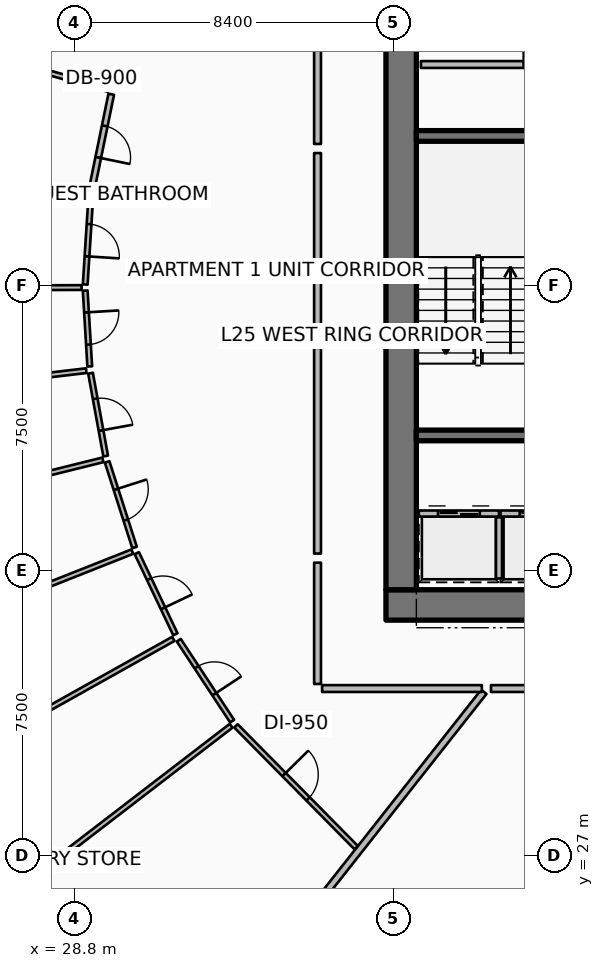
"""IFC4 building model, lengths in metres.
Left out: names, types, materials, properties, quantities, classifications, styles, units other than length and angle.
Written with IfcOpenShell. Run it as: python <this file> out.ifc"""

import sys

from ifc_helpers import new_model, si_unit, direction, frame, frame_2d, origin, place, context, subcontext, project, spatial, rectangle, extrude, element, fill, save


model = new_model("IFC4")
c1 = context("Model", 3, precision=1e-05, world=origin(), true_north=direction((0.0, 1.0)))
c2 = subcontext(c1, "Body", "Model", "MODEL_VIEW")
j1 = project(units=[si_unit("LENGTHUNIT", "METRE"), si_unit("PLANEANGLEUNIT", "RADIAN")], contexts=[c1])
p1 = place(None, origin())
s1 = spatial("IfcSite", under=j1, at=p1, CompositionType="ELEMENT")
p2 = place(p1, origin())
s2 = spatial("IfcBuilding", under=s1, at=p2, CompositionType="ELEMENT")
p3 = place(p2, frame((0.0, 0.0, 101.4)))
s3 = spatial("IfcBuildingStorey", under=s2, at=p3, CompositionType="ELEMENT", Elevation=101.4)
p4 = place(p3, frame((37.0, 33.6, 0.0), z_axis=(0.0, 0.0, 1.0), x_axis=(1.0, 0.0, 0.0)))
e1 = element("IfcWall", 1, at=p4, inside=s3, PredefinedType="SHEAR", context=c2, shape_type="SweptSolid", body=[
    extrude(rectangle(XDim=9.9, YDim=0.8, at=frame_2d((4.95, 0.0))), origin(), (0.0, 0.0, 1.0), 3.75),
])
p5 = place(p3, frame((37.4, 34.0, 0.0), z_axis=(0.0, 0.0, 1.0), x_axis=(0.0, 1.0, 0.0)))
e2 = element("IfcWall", 2, at=p5, inside=s3, PredefinedType="SHEAR", context=c2, shape_type="SweptSolid", body=[
    extrude(rectangle(XDim=16.0, YDim=0.8, at=frame_2d((8.0, 0.0))), origin(), (0.0, 0.0, 1.0), 3.75),
])
for number, where, z_axis, x_axis in (
    (3, (37.8, 38.06, 0.0), (0.0, 0.0, 1.0), (1.0, 0.0, 0.0)),
    (4, (37.8, 45.94, 0.0), (0.0, 0.0, 1.0), (1.0, 0.0, 0.0)),
):
    element("IfcWall", number, at=place(p3, frame(where, z_axis=z_axis, x_axis=x_axis)), inside=s3, PredefinedType="SHEAR", context=c2, shape_type="SweptSolid", body=[
        extrude(rectangle(XDim=3.5, YDim=0.28, at=frame_2d((1.75, 0.0))), origin(), (0.0, 0.0, 1.0), 3.75),
    ])
p6 = place(p3, frame((37.865, 36.005, 0.0), z_axis=(0.0, 0.0, 1.0), x_axis=(1.0, 0.0, 0.0)))
e5 = element("IfcWall", 5, at=p6, inside=s3, PredefinedType="PARTITIONING", context=c2, shape_type="SweptSolid", body=[
    extrude(rectangle(XDim=2.11, YDim=0.16, at=frame_2d((1.055, 0.0))), origin(), (0.0, 0.0, 1.0), 3.5),
])
p7 = place(p6, frame((0.505, 0.0, 0.0)))
e6 = element("IfcOpeningElement", 6, at=p7, cuts=e5, PredefinedType="OPENING", context=c2, shape_type="SweptSolid", body=[
    extrude(rectangle(XDim=1.1, YDim=2.1, at=frame_2d((0.55, 1.05))), frame((0.0, 0.09, 0.0), z_axis=(0.0, -1.0, 0.0), x_axis=(1.0, 0.0, 0.0)), (0.0, 0.0, 1.0), 0.18),
])
p8 = place(p3, frame((39.975, 34.295, 0.0), z_axis=(0.0, 0.0, 1.0), x_axis=(0.0, 1.0, 0.0)))
e7 = element("IfcWall", 7, at=p8, inside=s3, PredefinedType="PARTITIONING", context=c2, shape_type="SweptSolid", body=[
    extrude(rectangle(XDim=1.61, YDim=0.16, at=frame_2d((0.805, 0.0))), origin(), (0.0, 0.0, 1.0), 3.5),
])
p9 = place(p3, frame((40.015, 36.005, 0.0), z_axis=(0.0, 0.0, 1.0), x_axis=(1.0, 0.0, 0.0)))
e8 = element("IfcWall", 8, at=p9, inside=s3, PredefinedType="PARTITIONING", context=c2, shape_type="SweptSolid", body=[
    extrude(rectangle(XDim=2.11, YDim=0.16, at=frame_2d((1.055, 0.0))), origin(), (0.0, 0.0, 1.0), 3.5),
])
p10 = place(p9, frame((0.505, 0.0, 0.0)))
e9 = element("IfcOpeningElement", 9, at=p10, cuts=e8, PredefinedType="OPENING", context=c2, shape_type="SweptSolid", body=[
    extrude(rectangle(XDim=1.1, YDim=2.1, at=frame_2d((0.55, 1.05))), frame((0.0, 0.09, 0.0), z_axis=(0.0, -1.0, 0.0), x_axis=(1.0, 0.0, 0.0)), (0.0, 0.0, 1.0), 0.18),
])
p11 = place(p3, frame((37.92, 47.82, 0.0), z_axis=(0.0, 0.0, 1.0), x_axis=(1.0, 0.0, 0.0)))
e10 = element("IfcWall", 10, at=p11, inside=s3, PredefinedType="PARTITIONING", context=c2, shape_type="SweptSolid", body=[
    extrude(rectangle(XDim=6.26, YDim=0.18, at=frame_2d((3.13, 0.0))), origin(), (0.0, 0.0, 1.0), 3.5),
])
p12 = place(p11, frame((2.705, 0.0, 0.0)))
e11 = element("IfcOpeningElement", 11, at=p12, cuts=e10, PredefinedType="OPENING", context=c2, shape_type="SweptSolid", body=[
    extrude(rectangle(XDim=0.85, YDim=2.06, at=frame_2d((0.425, 1.03))), frame((0.0, 0.1, 0.0), z_axis=(0.0, -1.0, 0.0), x_axis=(1.0, 0.0, 0.0)), (0.0, 0.0, 1.0), 0.2),
])
p13 = place(p3, frame((39.575, 31.314, 0.0), z_axis=(0.0, 0.0, 1.0), x_axis=(-0.619083417853, -0.785325233098, 0.0)))
e12 = element("IfcWall", 12, at=p13, inside=s3, PredefinedType="PARTITIONING", context=c2, shape_type="SweptSolid", body=[
    extrude(rectangle(XDim=15.063, YDim=0.18, at=frame_2d((7.532, 0.0))), origin(), (0.0, 0.0, 1.0), 2.94),
])
p14 = place(p3, frame((35.2, 51.971, 0.0), z_axis=(0.0, 0.0, 1.0), x_axis=(0.0, -1.0, 0.0)))
e13 = element("IfcWall", 13, at=p14, inside=s3, PredefinedType="PARTITIONING", context=c2, shape_type="SweptSolid", body=[
    extrude(rectangle(XDim=6.241, YDim=0.18, at=frame_2d((3.12, 0.0))), origin(), (0.0, 0.0, 1.0), 2.94),
])
p15 = place(p14, frame((2.57, 0.0, 0.0)))
e14 = element("IfcOpeningElement", 14, at=p15, cuts=e13, PredefinedType="OPENING", context=c2, shape_type="SweptSolid", body=[
    extrude(rectangle(XDim=1.1, YDim=2.1, at=frame_2d((0.55, 1.05))), frame((0.0, 0.1, 0.0), z_axis=(0.0, -1.0, 0.0), x_axis=(1.0, 0.0, 0.0)), (0.0, 0.0, 1.0), 0.2),
])
p16 = place(p3, frame((35.2, 45.49, 0.0), z_axis=(0.0, 0.0, 1.0), x_axis=(0.0, -1.0, 0.0)))
e15 = element("IfcWall", 15, at=p16, inside=s3, PredefinedType="PARTITIONING", context=c2, shape_type="SweptSolid", body=[
    extrude(rectangle(XDim=4.885, YDim=0.18, at=frame_2d((2.442, 0.0))), origin(), (0.0, 0.0, 1.0), 2.94),
])
p17 = place(p3, frame((29.695, 47.163, 0.0), z_axis=(0.0, 0.0, 1.0), x_axis=(-0.962455839824, 0.271438310467, 0.0)))
e16 = element("IfcWall", 16, at=p17, inside=s3, PredefinedType="PARTITIONING", context=c2, shape_type="SweptSolid", body=[
    extrude(rectangle(XDim=9.552, YDim=0.125, at=frame_2d((4.776, 0.0))), origin(), (0.0, 0.0, 1.0), 2.94),
])
p18 = place(p3, frame((29.771, 47.037, 0.0), z_axis=(0.0, 0.0, 1.0), x_axis=(-0.201031337284, -0.979584810739, 0.0)))
e17 = element("IfcWall", 17, at=p18, inside=s3, PredefinedType="PARTITIONING", context=c2, shape_type="SweptSolid", body=[
    extrude(rectangle(XDim=2.549, YDim=0.15, at=frame_2d((1.274, 0.0))), origin(), (0.0, 0.0, 1.0), 2.94),
])
p19 = place(p18, frame((0.85, 0.0, 0.0)))
e18 = element("IfcOpeningElement", 18, at=p19, cuts=e17, PredefinedType="OPENING", context=c2, shape_type="SweptSolid", body=[
    extrude(rectangle(XDim=0.85, YDim=2.06, at=frame_2d((0.425, 1.03))), frame((0.0, 0.085, 0.0), z_axis=(0.0, -1.0, 0.0), x_axis=(1.0, 0.0, 0.0)), (0.0, 0.0, 1.0), 0.17),
])
p20 = place(p3, frame((29.151, 44.464, 0.0), z_axis=(0.0, 0.0, 1.0), x_axis=(-0.991563130501, 0.129624682181, 0.0)))
e19 = element("IfcWall", 19, at=p20, inside=s3, PredefinedType="PARTITIONING", context=c2, shape_type="SweptSolid", body=[
    extrude(rectangle(XDim=4.46, YDim=0.15, at=frame_2d((2.23, 0.0))), origin(), (0.0, 0.0, 1.0), 2.94),
])
p21 = place(p3, frame((28.991, 41.951, 0.0), z_axis=(0.0, 0.0, 1.0), x_axis=(-0.999996643903, -0.002590788034, 0.0)))
e20 = element("IfcWall", 20, at=p21, inside=s3, PredefinedType="PARTITIONING", context=c2, shape_type="SweptSolid", body=[
    extrude(rectangle(XDim=10.271, YDim=0.125, at=frame_2d((5.136, 0.0))), origin(), (0.0, 0.0, 1.0), 2.94),
])
p22 = place(p3, frame((29.235, 44.362, 0.0), z_axis=(0.0, 0.0, 1.0), x_axis=(-0.063647003528, -0.99797247404, 0.0)))
e21 = element("IfcWall", 21, at=p22, inside=s3, PredefinedType="PARTITIONING", context=c2, shape_type="SweptSolid", body=[
    extrude(rectangle(XDim=2.336, YDim=0.125, at=frame_2d((1.168, 0.0))), origin(), (0.0, 0.0, 1.0), 2.94),
])
p23 = place(p22, frame((0.743, 0.0, 0.0)))
e22 = element("IfcOpeningElement", 22, at=p23, cuts=e21, PredefinedType="OPENING", context=c2, shape_type="SweptSolid", body=[
    extrude(rectangle(XDim=0.85, YDim=2.06, at=frame_2d((0.425, 1.03))), frame((0.0, 0.073, 0.0), z_axis=(0.0, -1.0, 0.0), x_axis=(1.0, 0.0, 0.0)), (0.0, 0.0, 1.0), 0.145),
])
p24 = place(p3, frame((29.086, 41.871, 0.0), z_axis=(0.0, 0.0, 1.0), x_axis=(0.060104090143, -0.99819211495, 0.0)))
e23 = element("IfcWall", 23, at=p24, inside=s3, PredefinedType="PARTITIONING", context=c2, shape_type="SweptSolid", body=[
    extrude(rectangle(XDim=1.999, YDim=0.125, at=frame_2d((0.999, 0.0))), origin(), (0.0, 0.0, 1.0), 2.94),
])
p25 = place(p24, frame((0.574, 0.0, 0.0)))
e24 = element("IfcOpeningElement", 24, at=p25, cuts=e23, PredefinedType="OPENING", context=c2, shape_type="SweptSolid", body=[
    extrude(rectangle(XDim=0.85, YDim=2.06, at=frame_2d((0.425, 1.03))), frame((0.0, 0.073, 0.0), z_axis=(0.0, -1.0, 0.0), x_axis=(1.0, 0.0, 0.0)), (0.0, 0.0, 1.0), 0.145),
])
p26 = place(p3, frame((35.2, 40.365, 0.0), z_axis=(0.0, 0.0, 1.0), x_axis=(0.0, -1.0, 0.0)))
e25 = element("IfcWall", 25, at=p26, inside=s3, PredefinedType="PARTITIONING", context=c2, shape_type="SweptSolid", body=[
    extrude(rectangle(XDim=5.413, YDim=0.18, at=frame_2d((2.707, 0.0))), origin(), (0.0, 0.0, 1.0), 2.94),
])
p27 = place(p3, frame((29.113, 39.764, 0.0), z_axis=(0.0, 0.0, 1.0), x_axis=(-0.993070875002, -0.117516965677, 0.0)))
e26 = element("IfcWall", 26, at=p27, inside=s3, PredefinedType="PARTITIONING", context=c2, shape_type="SweptSolid", body=[
    extrude(rectangle(XDim=10.46, YDim=0.125, at=frame_2d((5.23, 0.0))), origin(), (0.0, 0.0, 1.0), 2.94),
])
p28 = place(p3, frame((29.552, 37.417, 0.0), z_axis=(0.0, 0.0, 1.0), x_axis=(-0.970504192203, -0.241084244437, 0.0)))
e27 = element("IfcWall", 27, at=p28, inside=s3, PredefinedType="PARTITIONING", context=c2, shape_type="SweptSolid", body=[
    extrude(rectangle(XDim=9.976, YDim=0.125, at=frame_2d((4.988, 0.0))), origin(), (0.0, 0.0, 1.0), 2.94),
])
p29 = place(p3, frame((30.326, 35.002, 0.0), z_axis=(0.0, 0.0, 1.0), x_axis=(-0.929777602375, -0.368121732748, 0.0)))
e28 = element("IfcWall", 28, at=p29, inside=s3, PredefinedType="PARTITIONING", context=c2, shape_type="SweptSolid", body=[
    extrude(rectangle(XDim=9.961, YDim=0.125, at=frame_2d((4.98, 0.0))), origin(), (0.0, 0.0, 1.0), 2.94),
])
p30 = place(p3, frame((29.227, 39.698, 0.0), z_axis=(0.0, 0.0, 1.0), x_axis=(0.179602920825, -0.983739188419, 0.0)))
e29 = element("IfcWall", 29, at=p30, inside=s3, PredefinedType="PARTITIONING", context=c2, shape_type="SweptSolid", body=[
    extrude(rectangle(XDim=2.216, YDim=0.125, at=frame_2d((1.108, 0.0))), origin(), (0.0, 0.0, 1.0), 2.94),
])
p31 = place(p30, frame((0.683, 0.0, 0.0)))
e30 = element("IfcOpeningElement", 30, at=p31, cuts=e29, PredefinedType="OPENING", context=c2, shape_type="SweptSolid", body=[
    extrude(rectangle(XDim=0.85, YDim=2.06, at=frame_2d((0.425, 1.03))), frame((0.0, 0.073, 0.0), z_axis=(0.0, -1.0, 0.0), x_axis=(1.0, 0.0, 0.0)), (0.0, 0.0, 1.0), 0.145),
])
p32 = place(p3, frame((29.663, 37.363, 0.0), z_axis=(0.0, 0.0, 1.0), x_axis=(0.305393983716, -0.952226083822, 0.0)))
e31 = element("IfcWall", 31, at=p32, inside=s3, PredefinedType="PARTITIONING", context=c2, shape_type="SweptSolid", body=[
    extrude(rectangle(XDim=2.364, YDim=0.125, at=frame_2d((1.182, 0.0))), origin(), (0.0, 0.0, 1.0), 2.94),
])
p33 = place(p32, frame((0.757, 0.0, 0.0)))
e32 = element("IfcOpeningElement", 32, at=p33, cuts=e31, PredefinedType="OPENING", context=c2, shape_type="SweptSolid", body=[
    extrude(rectangle(XDim=0.85, YDim=2.06, at=frame_2d((0.425, 1.03))), frame((0.0, 0.073, 0.0), z_axis=(0.0, -1.0, 0.0), x_axis=(1.0, 0.0, 0.0)), (0.0, 0.0, 1.0), 0.145),
])
p34 = place(p3, frame((30.444, 34.963, 0.0), z_axis=(0.0, 0.0, 1.0), x_axis=(0.429404357622, -0.903112339443, 0.0)))
e33 = element("IfcWall", 33, at=p34, inside=s3, PredefinedType="PARTITIONING", context=c2, shape_type="SweptSolid", body=[
    extrude(rectangle(XDim=2.364, YDim=0.125, at=frame_2d((1.182, 0.0))), origin(), (0.0, 0.0, 1.0), 2.94),
])
p35 = place(p34, frame((0.757, 0.0, 0.0)))
e34 = element("IfcOpeningElement", 34, at=p35, cuts=e33, PredefinedType="OPENING", context=c2, shape_type="SweptSolid", body=[
    extrude(rectangle(XDim=0.85, YDim=2.06, at=frame_2d((0.425, 1.03))), frame((0.0, 0.073, 0.0), z_axis=(0.0, -1.0, 0.0), x_axis=(1.0, 0.0, 0.0)), (0.0, 0.0, 1.0), 0.145),
])
p36 = place(p3, frame((35.2, 34.712, 0.0), z_axis=(0.0, 0.0, 1.0), x_axis=(0.0, -1.0, 0.0)))
e35 = element("IfcWall", 35, at=p36, inside=s3, PredefinedType="PARTITIONING", context=c2, shape_type="SweptSolid", body=[
    extrude(rectangle(XDim=3.192, YDim=0.18, at=frame_2d((1.596, 0.0))), origin(), (0.0, 0.0, 1.0), 2.94),
])
p37 = place(p3, frame((35.32, 31.4, 0.0), z_axis=(0.0, 0.0, 1.0), x_axis=(1.0, 0.0, 0.0)))
e36 = element("IfcWall", 36, at=p37, inside=s3, PredefinedType="PARTITIONING", context=c2, shape_type="SweptSolid", body=[
    extrude(rectangle(XDim=4.204, YDim=0.18, at=frame_2d((2.102, 0.0))), origin(), (0.0, 0.0, 1.0), 2.94),
])
p38 = place(p3, frame((31.406, 32.707, 0.0), z_axis=(0.0, 0.0, 1.0), x_axis=(-0.872500841978, -0.488612608052, 0.0)))
e37 = element("IfcWall", 37, at=p38, inside=s3, PredefinedType="PARTITIONING", context=c2, shape_type="SweptSolid", body=[
    extrude(rectangle(XDim=10.46, YDim=0.125, at=frame_2d((5.23, 0.0))), origin(), (0.0, 0.0, 1.0), 2.94),
])
p39 = place(p3, frame((32.925, 30.42, 0.0), z_axis=(0.0, 0.0, 1.0), x_axis=(-0.793033627653, -0.609177860244, 0.0)))
e38 = element("IfcWall", 38, at=p39, inside=s3, PredefinedType="PARTITIONING", context=c2, shape_type="SweptSolid", body=[
    extrude(rectangle(XDim=10.099, YDim=0.125, at=frame_2d((5.049, 0.0))), origin(), (0.0, 0.0, 1.0), 2.94),
])
p40 = place(p3, frame((31.548, 32.672, 0.0), z_axis=(0.0, 0.0, 1.0), x_axis=(0.550387635728, -0.834909246827, 0.0)))
e39 = element("IfcWall", 39, at=p40, inside=s3, PredefinedType="PARTITIONING", context=c2, shape_type="SweptSolid", body=[
    extrude(rectangle(XDim=2.552, YDim=0.125, at=frame_2d((1.276, 0.0))), origin(), (0.0, 0.0, 1.0), 2.94),
])
p41 = place(p40, frame((0.851, 0.0, 0.0)))
e40 = element("IfcOpeningElement", 40, at=p41, cuts=e39, PredefinedType="OPENING", context=c2, shape_type="SweptSolid", body=[
    extrude(rectangle(XDim=0.85, YDim=2.06, at=frame_2d((0.425, 1.03))), frame((0.0, 0.073, 0.0), z_axis=(0.0, -1.0, 0.0), x_axis=(1.0, 0.0, 0.0)), (0.0, 0.0, 1.0), 0.145),
])
p42 = place(p3, frame((33.053, 30.418, 0.0), z_axis=(0.0, 0.0, 1.0), x_axis=(0.702647387595, -0.711538227157, 0.0)))
e41 = element("IfcWall", 41, at=p42, inside=s3, PredefinedType="PARTITIONING", context=c2, shape_type="SweptSolid", body=[
    extrude(rectangle(XDim=4.503, YDim=0.125, at=frame_2d((2.252, 0.0))), origin(), (0.0, 0.0, 1.0), 2.94),
])
p43 = place(p42, frame((1.802, 0.0, 0.0)))
e42 = element("IfcOpeningElement", 42, at=p43, cuts=e41, PredefinedType="OPENING", context=c2, shape_type="SweptSolid", body=[
    extrude(rectangle(XDim=0.9, YDim=2.08, at=frame_2d((0.45, 1.04))), frame((0.0, 0.073, 0.0), z_axis=(0.0, -1.0, 0.0), x_axis=(1.0, 0.0, 0.0)), (0.0, 0.0, 1.0), 0.145),
])
p44 = place(p3, frame((39.764, 31.4, 0.0), z_axis=(0.0, 0.0, 1.0), x_axis=(1.0, 0.0, 0.0)))
e43 = element("IfcWall", 43, at=p44, inside=s3, PredefinedType="PARTITIONING", context=c2, shape_type="SweptSolid", body=[
    extrude(rectangle(XDim=5.127, YDim=0.18, at=frame_2d((2.563, 0.0))), origin(), (0.0, 0.0, 1.0), 2.94),
])
p45 = place(p44, frame((2.013, 0.0, 0.0)))
e44 = element("IfcOpeningElement", 44, at=p45, cuts=e43, PredefinedType="OPENING", context=c2, shape_type="SweptSolid", body=[
    extrude(rectangle(XDim=1.1, YDim=2.1, at=frame_2d((0.55, 1.05))), frame((0.0, 0.1, 0.0), z_axis=(0.0, -1.0, 0.0), x_axis=(1.0, 0.0, 0.0)), (0.0, 0.0, 1.0), 0.2),
])
p46 = place(p7, origin())
e45 = element("IfcDoor", 45, at=p46, inside=s3, OperationType="DOUBLE_DOOR_SLIDING", PredefinedType="DOOR", context=c2, shape_type="SweptSolid", body=[
    extrude(rectangle(XDim=1.1, YDim=2.1, at=frame_2d((0.55, 1.05))), frame((0.0, 0.025, 0.0), z_axis=(0.0, -1.0, 0.0), x_axis=(1.0, 0.0, 0.0)), (0.0, 0.0, 1.0), 0.05),
])
fill(e6, e45)
p47 = place(p10, origin())
e46 = element("IfcDoor", 46, at=p47, inside=s3, OperationType="DOUBLE_DOOR_SLIDING", PredefinedType="DOOR", context=c2, shape_type="SweptSolid", body=[
    extrude(rectangle(XDim=1.1, YDim=2.1, at=frame_2d((0.55, 1.05))), frame((0.0, 0.025, 0.0), z_axis=(0.0, -1.0, 0.0), x_axis=(1.0, 0.0, 0.0)), (0.0, 0.0, 1.0), 0.05),
])
fill(e9, e46)
p48 = place(p12, origin())
e47 = element("IfcDoor", 47, at=p48, inside=s3, OperationType="SINGLE_SWING_LEFT", PredefinedType="DOOR", context=c2, shape_type="SweptSolid", body=[
    extrude(rectangle(XDim=0.85, YDim=2.06, at=frame_2d((0.425, 1.03))), frame((0.0, 0.025, 0.0), z_axis=(0.0, -1.0, 0.0), x_axis=(1.0, 0.0, 0.0)), (0.0, 0.0, 1.0), 0.05),
])
fill(e11, e47)
p49 = place(p19, origin())
e48 = element("IfcDoor", 48, at=p49, inside=s3, OperationType="SINGLE_SWING_RIGHT", PredefinedType="DOOR", context=c2, shape_type="SweptSolid", body=[
    extrude(rectangle(XDim=0.85, YDim=2.06, at=frame_2d((0.425, 1.03))), frame((0.0, 0.025, 0.0), z_axis=(0.0, -1.0, 0.0), x_axis=(1.0, 0.0, 0.0)), (0.0, 0.0, 1.0), 0.05),
])
fill(e18, e48)
p50 = place(p23, origin())
e49 = element("IfcDoor", 49, at=p50, inside=s3, OperationType="SINGLE_SWING_RIGHT", PredefinedType="DOOR", context=c2, shape_type="SweptSolid", body=[
    extrude(rectangle(XDim=0.85, YDim=2.06, at=frame_2d((0.425, 1.03))), frame((0.0, 0.025, 0.0), z_axis=(0.0, -1.0, 0.0), x_axis=(1.0, 0.0, 0.0)), (0.0, 0.0, 1.0), 0.05),
])
fill(e22, e49)
p51 = place(p25, origin())
e50 = element("IfcDoor", 50, at=p51, inside=s3, OperationType="SINGLE_SWING_LEFT", PredefinedType="DOOR", context=c2, shape_type="SweptSolid", body=[
    extrude(rectangle(XDim=0.85, YDim=2.06, at=frame_2d((0.425, 1.03))), frame((0.0, 0.025, 0.0), z_axis=(0.0, -1.0, 0.0), x_axis=(1.0, 0.0, 0.0)), (0.0, 0.0, 1.0), 0.05),
])
fill(e24, e50)
p52 = place(p31, origin())
e51 = element("IfcDoor", 51, at=p52, inside=s3, OperationType="SINGLE_SWING_RIGHT", PredefinedType="DOOR", context=c2, shape_type="SweptSolid", body=[
    extrude(rectangle(XDim=0.85, YDim=2.06, at=frame_2d((0.425, 1.03))), frame((0.0, 0.025, 0.0), z_axis=(0.0, -1.0, 0.0), x_axis=(1.0, 0.0, 0.0)), (0.0, 0.0, 1.0), 0.05),
])
fill(e30, e51)
p53 = place(p33, origin())
e52 = element("IfcDoor", 52, at=p53, inside=s3, OperationType="SINGLE_SWING_LEFT", PredefinedType="DOOR", context=c2, shape_type="SweptSolid", body=[
    extrude(rectangle(XDim=0.85, YDim=2.06, at=frame_2d((0.425, 1.03))), frame((0.0, 0.025, 0.0), z_axis=(0.0, -1.0, 0.0), x_axis=(1.0, 0.0, 0.0)), (0.0, 0.0, 1.0), 0.05),
])
fill(e32, e52)
p54 = place(p35, origin())
e53 = element("IfcDoor", 53, at=p54, inside=s3, OperationType="SINGLE_SWING_RIGHT", PredefinedType="DOOR", context=c2, shape_type="SweptSolid", body=[
    extrude(rectangle(XDim=0.85, YDim=2.06, at=frame_2d((0.425, 1.03))), frame((0.0, 0.025, 0.0), z_axis=(0.0, -1.0, 0.0), x_axis=(1.0, 0.0, 0.0)), (0.0, 0.0, 1.0), 0.05),
])
fill(e34, e53)
p55 = place(p41, origin())
e54 = element("IfcDoor", 54, at=p55, inside=s3, OperationType="SINGLE_SWING_RIGHT", PredefinedType="DOOR", context=c2, shape_type="SweptSolid", body=[
    extrude(rectangle(XDim=0.85, YDim=2.06, at=frame_2d((0.425, 1.03))), frame((0.0, 0.025, 0.0), z_axis=(0.0, -1.0, 0.0), x_axis=(1.0, 0.0, 0.0)), (0.0, 0.0, 1.0), 0.05),
])
fill(e40, e54)
p56 = place(p43, origin())
e55 = element("IfcDoor", 55, at=p56, inside=s3, OperationType="SINGLE_SWING_LEFT", PredefinedType="DOOR", context=c2, shape_type="SweptSolid", body=[
    extrude(rectangle(XDim=0.9, YDim=2.08, at=frame_2d((0.45, 1.04))), frame((0.0, 0.025, 0.0), z_axis=(0.0, -1.0, 0.0), x_axis=(1.0, 0.0, 0.0)), (0.0, 0.0, 1.0), 0.05),
])
fill(e42, e55)
save(model, sys.argv[1])
